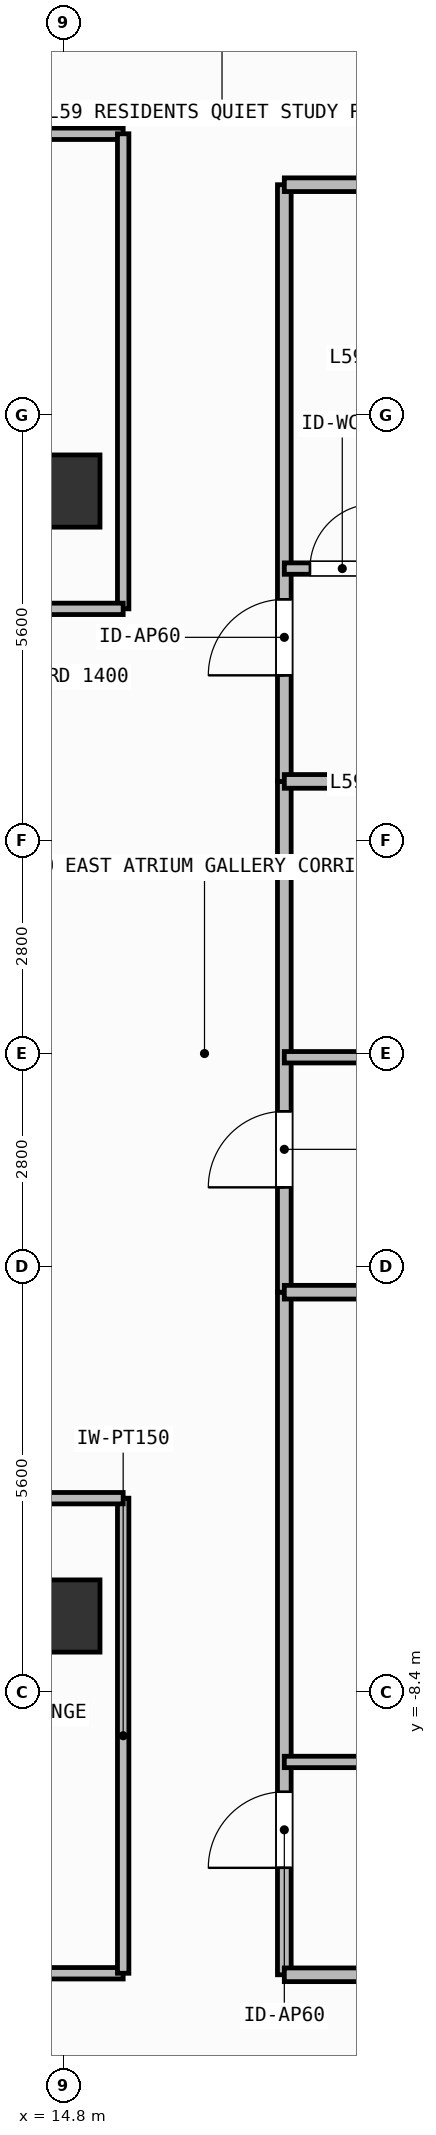
"""IFC4 building model, lengths in metres.
Left out: names, types, materials, properties, quantities, classifications, styles, units other than length and angle.
Written with IfcOpenShell. Run it as: python <this file> out.ifc"""

import sys

from ifc_helpers import new_model, si_unit, direction, frame, frame_2d, origin, origin_2d, place, context, subcontext, project, spatial, rectangle, extrude, element, fill, save


model = new_model("IFC4")
c1 = context("Model", 3, precision=1e-05, world=origin(), true_north=direction((0.0, 1.0)))
c2 = subcontext(c1, "Body", "Model", "MODEL_VIEW")
j1 = project(units=[si_unit("LENGTHUNIT", "METRE"), si_unit("PLANEANGLEUNIT", "RADIAN")], contexts=[c1])
p1 = place(None, origin())
s1 = spatial("IfcSite", under=j1, at=p1, CompositionType="ELEMENT")
p2 = place(p1, origin())
s2 = spatial("IfcBuilding", under=s1, at=p2, CompositionType="ELEMENT")
p3 = place(p2, frame((0.0, 0.0, 243.0)))
s3 = spatial("IfcBuildingStorey", under=s2, at=p3, CompositionType="ELEMENT", Elevation=243.0)
for number, where, z_axis, x_axis in (
    (1, (14.8, -7.4, 0.0), (0.0, 0.0, 1.0), (1.0, 0.0, 0.0)),
    (2, (14.8, 7.4, 0.0), (0.0, 0.0, 1.0), (1.0, 0.0, 0.0)),
):
    element("IfcColumn", number, at=place(p3, frame(where, z_axis=z_axis, x_axis=x_axis)), inside=s3, PredefinedType="COLUMN", context=c2, shape_type="SweptSolid", body=[
        extrude(rectangle(XDim=0.95, YDim=0.95, at=origin_2d()), origin(), (0.0, 0.0, 1.0), 3.9),
    ])
p4 = place(p3, frame((10.1, -12.1, 0.0), z_axis=(0.0, 0.0, 1.0), x_axis=(1.0, 0.0, 0.0)))
e3 = element("IfcWall", 3, at=p4, inside=s3, PredefinedType="PARTITIONING", context=c2, shape_type="SweptSolid", body=[
    extrude(rectangle(XDim=5.48, YDim=0.15, at=frame_2d((2.74, 0.0))), origin(), (0.0, 0.0, 1.0), 3.68),
])
p5 = place(p4, frame((2.29, 0.0, 0.0)))
e4 = element("IfcOpeningElement", 4, at=p5, cuts=e3, PredefinedType="OPENING", context=c2, shape_type="SweptSolid", body=[
    extrude(rectangle(XDim=0.9, YDim=2.1, at=frame_2d((0.45, 1.05))), frame((0.0, 0.085, 0.0), z_axis=(0.0, -1.0, 0.0), x_axis=(1.0, 0.0, 0.0)), (0.0, 0.0, 1.0), 0.17),
])
p6 = place(p3, frame((8.36, 12.1, 0.0), z_axis=(0.0, 0.0, 1.0), x_axis=(1.0, 0.0, 0.0)))
e5 = element("IfcWall", 5, at=p6, inside=s3, PredefinedType="PARTITIONING", context=c2, shape_type="SweptSolid", body=[
    extrude(rectangle(XDim=7.22, YDim=0.15, at=frame_2d((3.61, 0.0))), origin(), (0.0, 0.0, 1.0), 3.68),
])
p7 = place(p6, frame((3.513, 0.0, 0.0)))
e6 = element("IfcOpeningElement", 6, at=p7, cuts=e5, PredefinedType="OPENING", context=c2, shape_type="SweptSolid", body=[
    extrude(rectangle(XDim=0.9, YDim=2.1, at=frame_2d((0.45, 1.05))), frame((0.0, 0.085, 0.0), z_axis=(0.0, -1.0, 0.0), x_axis=(1.0, 0.0, 0.0)), (0.0, 0.0, 1.0), 0.17),
])
p8 = place(p3, frame((17.7, -12.12, 0.0), z_axis=(0.0, 0.0, 1.0), x_axis=(0.0, 1.0, 0.0)))
e7 = element("IfcWall", 7, at=p8, inside=s3, PredefinedType="PARTITIONING", context=c2, shape_type="SweptSolid", body=[
    extrude(rectangle(XDim=8.98, YDim=0.18, at=frame_2d((4.49, 0.0))), origin(), (0.0, 0.0, 1.0), 3.68),
])
p9 = place(p8, frame((1.407, 0.0, 0.0)))
e8 = element("IfcOpeningElement", 8, at=p9, cuts=e7, PredefinedType="OPENING", context=c2, shape_type="SweptSolid", body=[
    extrude(rectangle(XDim=1.0, YDim=2.2, at=frame_2d((0.5, 1.1))), frame((0.0, 0.1, 0.0), z_axis=(0.0, -1.0, 0.0), x_axis=(1.0, 0.0, 0.0)), (0.0, 0.0, 1.0), 0.2),
])
p10 = place(p3, frame((17.7, -9.32, 0.0), z_axis=(0.0, 0.0, 1.0), x_axis=(1.0, 0.0, 0.0)))
e9 = element("IfcWall", 9, at=p10, inside=s3, PredefinedType="PARTITIONING", context=c2, shape_type="SweptSolid", body=[
    extrude(rectangle(XDim=3.369, YDim=0.15, at=frame_2d((1.685, 0.0))), origin(), (0.0, 0.0, 1.0), 3.68),
])
p11 = place(p10, frame((1.175, 0.0, 0.0)))
e10 = element("IfcOpeningElement", 10, at=p11, cuts=e9, PredefinedType="OPENING", context=c2, shape_type="SweptSolid", body=[
    extrude(rectangle(XDim=0.85, YDim=2.1, at=frame_2d((0.425, 1.05))), frame((0.0, 0.085, 0.0), z_axis=(0.0, -1.0, 0.0), x_axis=(1.0, 0.0, 0.0)), (0.0, 0.0, 1.0), 0.17),
])
p12 = place(p3, frame((17.7, -3.14, 0.0), z_axis=(0.0, 0.0, 1.0), x_axis=(0.0, 1.0, 0.0)))
e11 = element("IfcWall", 11, at=p12, inside=s3, PredefinedType="PARTITIONING", context=c2, shape_type="SweptSolid", body=[
    extrude(rectangle(XDim=6.72, YDim=0.18, at=frame_2d((3.36, 0.0))), origin(), (0.0, 0.0, 1.0), 3.68),
])
p13 = place(p12, frame((1.379, 0.0, 0.0)))
e12 = element("IfcOpeningElement", 12, at=p13, cuts=e11, PredefinedType="OPENING", context=c2, shape_type="SweptSolid", body=[
    extrude(rectangle(XDim=1.0, YDim=2.2, at=frame_2d((0.5, 1.1))), frame((0.0, 0.1, 0.0), z_axis=(0.0, -1.0, 0.0), x_axis=(1.0, 0.0, 0.0)), (0.0, 0.0, 1.0), 0.2),
])
p14 = place(p3, frame((17.7, -0.049, 0.0), z_axis=(0.0, 0.0, 1.0), x_axis=(1.0, 0.0, 0.0)))
e13 = element("IfcWall", 13, at=p14, inside=s3, PredefinedType="PARTITIONING", context=c2, shape_type="SweptSolid", body=[
    extrude(rectangle(XDim=3.487, YDim=0.15, at=frame_2d((1.744, 0.0))), origin(), (0.0, 0.0, 1.0), 3.68),
])
p15 = place(p14, frame((1.229, 0.0, 0.0)))
e14 = element("IfcOpeningElement", 14, at=p15, cuts=e13, PredefinedType="OPENING", context=c2, shape_type="SweptSolid", body=[
    extrude(rectangle(XDim=0.85, YDim=2.1, at=frame_2d((0.425, 1.05))), frame((0.0, 0.085, 0.0), z_axis=(0.0, -1.0, 0.0), x_axis=(1.0, 0.0, 0.0)), (0.0, 0.0, 1.0), 0.17),
])
p16 = place(p3, frame((17.7, 3.58, 0.0), z_axis=(0.0, 0.0, 1.0), x_axis=(0.0, 1.0, 0.0)))
e15 = element("IfcWall", 15, at=p16, inside=s3, PredefinedType="PARTITIONING", context=c2, shape_type="SweptSolid", body=[
    extrude(rectangle(XDim=7.85, YDim=0.18, at=frame_2d((3.925, 0.0))), origin(), (0.0, 0.0, 1.0), 3.68),
])
p17 = place(p16, frame((1.396, 0.0, 0.0)))
e16 = element("IfcOpeningElement", 16, at=p17, cuts=e15, PredefinedType="OPENING", context=c2, shape_type="SweptSolid", body=[
    extrude(rectangle(XDim=1.0, YDim=2.2, at=frame_2d((0.5, 1.1))), frame((0.0, 0.1, 0.0), z_axis=(0.0, -1.0, 0.0), x_axis=(1.0, 0.0, 0.0)), (0.0, 0.0, 1.0), 0.2),
])
p18 = place(p3, frame((17.7, 6.38, 0.0), z_axis=(0.0, 0.0, 1.0), x_axis=(1.0, 0.0, 0.0)))
e17 = element("IfcWall", 17, at=p18, inside=s3, PredefinedType="PARTITIONING", context=c2, shape_type="SweptSolid", body=[
    extrude(rectangle(XDim=3.478, YDim=0.15, at=frame_2d((1.739, 0.0))), origin(), (0.0, 0.0, 1.0), 3.68),
])
p19 = place(p18, frame((0.337, 0.0, 0.0)))
e18 = element("IfcOpeningElement", 18, at=p19, cuts=e17, PredefinedType="OPENING", context=c2, shape_type="SweptSolid", body=[
    extrude(rectangle(XDim=0.85, YDim=2.1, at=frame_2d((0.425, 1.05))), frame((0.0, 0.085, 0.0), z_axis=(0.0, -1.0, 0.0), x_axis=(1.0, 0.0, 0.0)), (0.0, 0.0, 1.0), 0.17),
])
p20 = place(p3, frame((15.58, -12.1, 0.0), z_axis=(0.0, 0.0, 1.0), x_axis=(0.0, 1.0, 0.0)))
e19 = element("IfcWall", 19, at=p20, inside=s3, PredefinedType="PARTITIONING", context=c2, shape_type="SweptSolid", body=[
    extrude(rectangle(XDim=6.25, YDim=0.15, at=frame_2d((3.125, 0.0))), origin(), (0.0, 0.0, 1.0), 3.68),
])
p21 = place(p3, frame((8.96, -5.85, 0.0), z_axis=(0.0, 0.0, 1.0), x_axis=(1.0, 0.0, 0.0)))
e20 = element("IfcWall", 20, at=p21, inside=s3, PredefinedType="PARTITIONING", context=c2, shape_type="SweptSolid", body=[
    extrude(rectangle(XDim=6.62, YDim=0.15, at=frame_2d((3.31, 0.0))), origin(), (0.0, 0.0, 1.0), 3.68),
])
p22 = place(p3, frame((15.58, 5.85, 0.0), z_axis=(0.0, 0.0, 1.0), x_axis=(0.0, 1.0, 0.0)))
e21 = element("IfcWall", 21, at=p22, inside=s3, PredefinedType="PARTITIONING", context=c2, shape_type="SweptSolid", body=[
    extrude(rectangle(XDim=6.25, YDim=0.15, at=frame_2d((3.125, 0.0))), origin(), (0.0, 0.0, 1.0), 3.68),
])
p23 = place(p3, frame((8.96, 5.85, 0.0), z_axis=(0.0, 0.0, 1.0), x_axis=(1.0, 0.0, 0.0)))
e22 = element("IfcWall", 22, at=p23, inside=s3, PredefinedType="PARTITIONING", context=c2, shape_type="SweptSolid", body=[
    extrude(rectangle(XDim=6.62, YDim=0.15, at=frame_2d((3.31, 0.0))), origin(), (0.0, 0.0, 1.0), 3.68),
])
for number, where, z_axis, x_axis in (
    (23, (17.7, -3.14, 0.0), (0.0, 0.0, 1.0), (1.0, 0.0, 0.0)),
    (24, (17.7, 3.58, 0.0), (0.0, 0.0, 1.0), (1.0, 0.0, 0.0)),
    (25, (17.7, -12.12, 0.0), (0.0, 0.0, 1.0), (1.0, 0.0, 0.0)),
):
    element("IfcWall", number, at=place(p3, frame(where, z_axis=z_axis, x_axis=x_axis)), inside=s3, PredefinedType="PARTITIONING", context=c2, shape_type="SweptSolid", body=[
        extrude(rectangle(XDim=8.43, YDim=0.18, at=frame_2d((4.215, 0.0))), origin(), (0.0, 0.0, 1.0), 3.68),
    ])
p24 = place(p3, frame((17.7, 11.43, 0.0), z_axis=(0.0, 0.0, 1.0), x_axis=(1.0, 0.0, 0.0)))
e26 = element("IfcWall", 26, at=p24, inside=s3, PredefinedType="PARTITIONING", context=c2, shape_type="SweptSolid", body=[
    extrude(rectangle(XDim=8.43, YDim=0.18, at=frame_2d((4.215, 0.0))), origin(), (0.0, 0.0, 1.0), 3.42),
])
p25 = place(p9, origin())
e27 = element("IfcDoor", 27, at=p25, inside=s3, OperationType="SINGLE_SWING_LEFT", PredefinedType="DOOR", context=c2, shape_type="SweptSolid", body=[
    extrude(rectangle(XDim=1.0, YDim=2.2, at=frame_2d((0.5, 1.1))), frame((0.0, 0.025, 0.0), z_axis=(0.0, -1.0, 0.0), x_axis=(1.0, 0.0, 0.0)), (0.0, 0.0, 1.0), 0.05),
])
fill(e8, e27)
p26 = place(p13, origin())
e28 = element("IfcDoor", 28, at=p26, inside=s3, OperationType="SINGLE_SWING_LEFT", PredefinedType="DOOR", context=c2, shape_type="SweptSolid", body=[
    extrude(rectangle(XDim=1.0, YDim=2.2, at=frame_2d((0.5, 1.1))), frame((0.0, 0.025, 0.0), z_axis=(0.0, -1.0, 0.0), x_axis=(1.0, 0.0, 0.0)), (0.0, 0.0, 1.0), 0.05),
])
fill(e12, e28)
p27 = place(p17, origin())
e29 = element("IfcDoor", 29, at=p27, inside=s3, OperationType="SINGLE_SWING_LEFT", PredefinedType="DOOR", context=c2, shape_type="SweptSolid", body=[
    extrude(rectangle(XDim=1.0, YDim=2.2, at=frame_2d((0.5, 1.1))), frame((0.0, 0.025, 0.0), z_axis=(0.0, -1.0, 0.0), x_axis=(1.0, 0.0, 0.0)), (0.0, 0.0, 1.0), 0.05),
])
fill(e16, e29)
p28 = place(p19, origin())
e30 = element("IfcDoor", 30, at=p28, inside=s3, OperationType="SINGLE_SWING_RIGHT", PredefinedType="DOOR", context=c2, shape_type="SweptSolid", body=[
    extrude(rectangle(XDim=0.85, YDim=2.1, at=frame_2d((0.425, 1.05))), frame((0.0, 0.025, 0.0), z_axis=(0.0, -1.0, 0.0), x_axis=(1.0, 0.0, 0.0)), (0.0, 0.0, 1.0), 0.05),
])
fill(e18, e30)
save(model, sys.argv[1])
